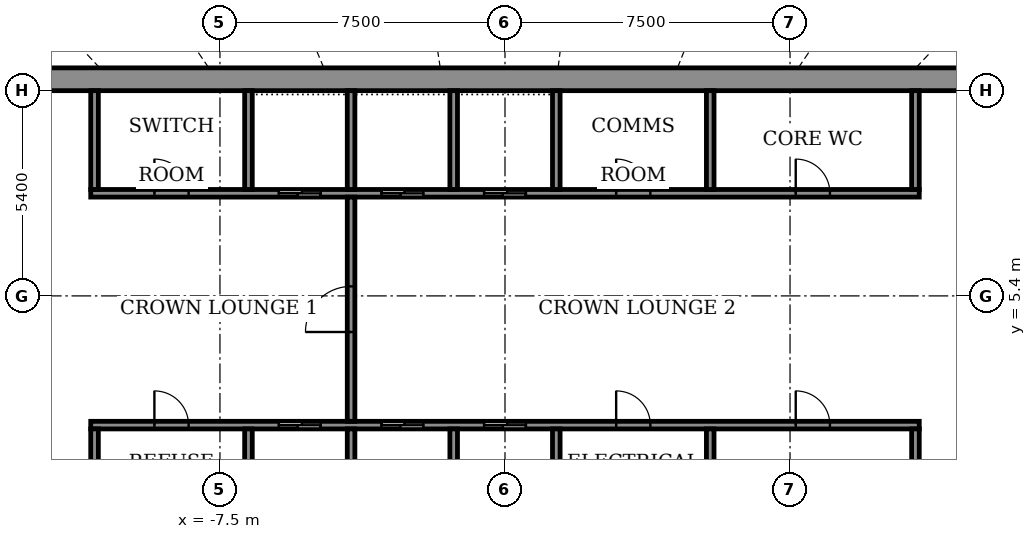
"""IFC4 building model, lengths in metres.
Left out: names, types, materials, properties, quantities, classifications, styles, units other than length and angle.
Written with IfcOpenShell. Run it as: python <this file> out.ifc"""

import sys

from ifc_helpers import new_model, si_unit, direction, frame, frame_2d, origin, place, context, subcontext, project, spatial, rectangle, extrude, element, fill, save


model = new_model("IFC4")
c1 = context("Model", 3, precision=1e-05, world=origin(), true_north=direction((0.0, 1.0)))
c2 = subcontext(c1, "Body", "Model", "MODEL_VIEW")
j1 = project(units=[si_unit("LENGTHUNIT", "METRE"), si_unit("PLANEANGLEUNIT", "RADIAN")], contexts=[c1])
p1 = place(None, origin())
s1 = spatial("IfcSite", under=j1, at=p1, CompositionType="ELEMENT")
p2 = place(p1, origin())
s2 = spatial("IfcBuilding", under=s1, at=p2, CompositionType="ELEMENT")
p3 = place(p2, frame((0.0, 0.0, 329.7)))
s3 = spatial("IfcBuildingStorey", under=s2, at=p3, CompositionType="ELEMENT", Elevation=329.7)
p4 = place(p3, frame((-14.4, 11.1, 0.0), z_axis=(0.0, 0.0, 1.0), x_axis=(1.0, 0.0, 0.0)))
e1 = element("IfcWall", 1, at=p4, inside=s3, PredefinedType="SHEAR", context=c2, shape_type="SweptSolid", body=[
    extrude(rectangle(XDim=28.8, YDim=0.6, at=frame_2d((14.4, 0.0))), origin(), (0.0, 0.0, 1.0), 4.6),
])
p5 = place(p3, frame((-10.9, 2.0, 0.0), z_axis=(0.0, 0.0, 1.0), x_axis=(1.0, 0.0, 0.0)))
e2 = element("IfcWall", 2, at=p5, inside=s3, PredefinedType="SHEAR", context=c2, shape_type="SweptSolid", body=[
    extrude(rectangle(XDim=21.8, YDim=0.2, at=frame_2d((10.9, 0.0))), origin(), (0.0, 0.0, 1.0), 4.05),
])
p6 = place(p5, frame((4.95, 0.0, 0.0)))
e3 = element("IfcOpeningElement", 3, at=p6, cuts=e2, PredefinedType="OPENING", context=c2, shape_type="SweptSolid", body=[
    extrude(rectangle(XDim=1.1, YDim=2.1, at=frame_2d((0.55, 1.05))), frame((0.0, 0.11, 0.0), z_axis=(0.0, -1.0, 0.0), x_axis=(1.0, 0.0, 0.0)), (0.0, 0.0, 1.0), 0.22),
])
p7 = place(p5, frame((7.65, 0.0, 0.0)))
e4 = element("IfcOpeningElement", 4, at=p7, cuts=e2, PredefinedType="OPENING", context=c2, shape_type="SweptSolid", body=[
    extrude(rectangle(XDim=1.1, YDim=2.1, at=frame_2d((0.55, 1.05))), frame((0.0, 0.11, 0.0), z_axis=(0.0, -1.0, 0.0), x_axis=(1.0, 0.0, 0.0)), (0.0, 0.0, 1.0), 0.22),
])
p8 = place(p5, frame((10.35, 0.0, 0.0)))
e5 = element("IfcOpeningElement", 5, at=p8, cuts=e2, PredefinedType="OPENING", context=c2, shape_type="SweptSolid", body=[
    extrude(rectangle(XDim=1.1, YDim=2.1, at=frame_2d((0.55, 1.05))), frame((0.0, 0.11, 0.0), z_axis=(0.0, -1.0, 0.0), x_axis=(1.0, 0.0, 0.0)), (0.0, 0.0, 1.0), 0.22),
])
p9 = place(p5, frame((1.675, 0.0, 0.0)))
e6 = element("IfcOpeningElement", 6, at=p9, cuts=e2, PredefinedType="OPENING", context=c2, shape_type="SweptSolid", body=[
    extrude(rectangle(XDim=0.9, YDim=2.1, at=frame_2d((0.45, 1.05))), frame((0.0, 0.11, 0.0), z_axis=(0.0, -1.0, 0.0), x_axis=(1.0, 0.0, 0.0)), (0.0, 0.0, 1.0), 0.22),
])
p10 = place(p5, frame((13.825, 0.0, 0.0)))
e7 = element("IfcOpeningElement", 7, at=p10, cuts=e2, PredefinedType="OPENING", context=c2, shape_type="SweptSolid", body=[
    extrude(rectangle(XDim=0.9, YDim=2.1, at=frame_2d((0.45, 1.05))), frame((0.0, 0.11, 0.0), z_axis=(0.0, -1.0, 0.0), x_axis=(1.0, 0.0, 0.0)), (0.0, 0.0, 1.0), 0.22),
])
p11 = place(p5, frame((18.55, 0.0, 0.0)))
e8 = element("IfcOpeningElement", 8, at=p11, cuts=e2, PredefinedType="OPENING", context=c2, shape_type="SweptSolid", body=[
    extrude(rectangle(XDim=0.9, YDim=2.1, at=frame_2d((0.45, 1.05))), frame((0.0, 0.11, 0.0), z_axis=(0.0, -1.0, 0.0), x_axis=(1.0, 0.0, 0.0)), (0.0, 0.0, 1.0), 0.22),
])
p12 = place(p3, frame((-10.9, 8.1, 0.0), z_axis=(0.0, 0.0, 1.0), x_axis=(1.0, 0.0, 0.0)))
e9 = element("IfcWall", 9, at=p12, inside=s3, PredefinedType="SHEAR", context=c2, shape_type="SweptSolid", body=[
    extrude(rectangle(XDim=21.8, YDim=0.2, at=frame_2d((10.9, 0.0))), origin(), (0.0, 0.0, 1.0), 4.05),
])
p13 = place(p12, frame((4.95, 0.0, 0.0)))
e10 = element("IfcOpeningElement", 10, at=p13, cuts=e9, PredefinedType="OPENING", context=c2, shape_type="SweptSolid", body=[
    extrude(rectangle(XDim=1.1, YDim=2.1, at=frame_2d((0.55, 1.05))), frame((0.0, 0.11, 0.0), z_axis=(0.0, -1.0, 0.0), x_axis=(1.0, 0.0, 0.0)), (0.0, 0.0, 1.0), 0.22),
])
p14 = place(p12, frame((7.65, 0.0, 0.0)))
e11 = element("IfcOpeningElement", 11, at=p14, cuts=e9, PredefinedType="OPENING", context=c2, shape_type="SweptSolid", body=[
    extrude(rectangle(XDim=1.1, YDim=2.1, at=frame_2d((0.55, 1.05))), frame((0.0, 0.11, 0.0), z_axis=(0.0, -1.0, 0.0), x_axis=(1.0, 0.0, 0.0)), (0.0, 0.0, 1.0), 0.22),
])
p15 = place(p12, frame((10.35, 0.0, 0.0)))
e12 = element("IfcOpeningElement", 12, at=p15, cuts=e9, PredefinedType="OPENING", context=c2, shape_type="SweptSolid", body=[
    extrude(rectangle(XDim=1.1, YDim=2.1, at=frame_2d((0.55, 1.05))), frame((0.0, 0.11, 0.0), z_axis=(0.0, -1.0, 0.0), x_axis=(1.0, 0.0, 0.0)), (0.0, 0.0, 1.0), 0.22),
])
p16 = place(p12, frame((1.675, 0.0, 0.0)))
e13 = element("IfcOpeningElement", 13, at=p16, cuts=e9, PredefinedType="OPENING", context=c2, shape_type="SweptSolid", body=[
    extrude(rectangle(XDim=0.9, YDim=2.1, at=frame_2d((0.45, 1.05))), frame((0.0, 0.11, 0.0), z_axis=(0.0, -1.0, 0.0), x_axis=(1.0, 0.0, 0.0)), (0.0, 0.0, 1.0), 0.22),
])
p17 = place(p12, frame((13.825, 0.0, 0.0)))
e14 = element("IfcOpeningElement", 14, at=p17, cuts=e9, PredefinedType="OPENING", context=c2, shape_type="SweptSolid", body=[
    extrude(rectangle(XDim=0.9, YDim=2.1, at=frame_2d((0.45, 1.05))), frame((0.0, 0.11, 0.0), z_axis=(0.0, -1.0, 0.0), x_axis=(1.0, 0.0, 0.0)), (0.0, 0.0, 1.0), 0.22),
])
p18 = place(p12, frame((18.55, 0.0, 0.0)))
e15 = element("IfcOpeningElement", 15, at=p18, cuts=e9, PredefinedType="OPENING", context=c2, shape_type="SweptSolid", body=[
    extrude(rectangle(XDim=0.9, YDim=2.1, at=frame_2d((0.45, 1.05))), frame((0.0, 0.11, 0.0), z_axis=(0.0, -1.0, 0.0), x_axis=(1.0, 0.0, 0.0)), (0.0, 0.0, 1.0), 0.22),
])
p19 = place(p3, frame((-10.8, -0.6, 0.0), z_axis=(0.0, 0.0, 1.0), x_axis=(0.0, 1.0, 0.0)))
e16 = element("IfcWall", 16, at=p19, inside=s3, PredefinedType="STANDARD", context=c2, shape_type="SweptSolid", body=[
    extrude(rectangle(XDim=2.5, YDim=0.2, at=frame_2d((1.25, 0.0))), origin(), (0.0, 0.0, 1.0), 4.05),
])
for number, where, z_axis, x_axis in (
    (17, (-6.75, -0.6, 0.0), (0.0, 0.0, 1.0), (0.0, 1.0, 0.0)),
    (18, (-4.05, -0.6, 0.0), (0.0, 0.0, 1.0), (0.0, 1.0, 0.0)),
    (19, (-1.35, -0.6, 0.0), (0.0, 0.0, 1.0), (0.0, 1.0, 0.0)),
    (20, (1.35, -0.6, 0.0), (0.0, 0.0, 1.0), (0.0, 1.0, 0.0)),
):
    element("IfcWall", number, at=place(p3, frame(where, z_axis=z_axis, x_axis=x_axis)), inside=s3, PredefinedType="SHEAR", context=c2, shape_type="SweptSolid", body=[
        extrude(rectangle(XDim=2.5, YDim=0.2, at=frame_2d((1.25, 0.0))), origin(), (0.0, 0.0, 1.0), 4.05),
    ])
for number, where, z_axis, x_axis in (
    (21, (5.4, -0.6, 0.0), (0.0, 0.0, 1.0), (0.0, 1.0, 0.0)),
    (22, (10.8, -0.6, 0.0), (0.0, 0.0, 1.0), (0.0, 1.0, 0.0)),
):
    element("IfcWall", number, at=place(p3, frame(where, z_axis=z_axis, x_axis=x_axis)), inside=s3, PredefinedType="STANDARD", context=c2, shape_type="SweptSolid", body=[
        extrude(rectangle(XDim=2.5, YDim=0.2, at=frame_2d((1.25, 0.0))), origin(), (0.0, 0.0, 1.0), 4.05),
    ])
p20 = place(p3, frame((-10.8, 8.2, 0.0), z_axis=(0.0, 0.0, 1.0), x_axis=(0.0, 1.0, 0.0)))
e23 = element("IfcWall", 23, at=p20, inside=s3, PredefinedType="STANDARD", context=c2, shape_type="SweptSolid", body=[
    extrude(rectangle(XDim=2.6, YDim=0.2, at=frame_2d((1.3, 0.0))), origin(), (0.0, 0.0, 1.0), 4.05),
])
for number, where, z_axis, x_axis in (
    (24, (-6.75, 8.2, 0.0), (0.0, 0.0, 1.0), (0.0, 1.0, 0.0)),
    (25, (-4.05, 8.2, 0.0), (0.0, 0.0, 1.0), (0.0, 1.0, 0.0)),
    (26, (-1.35, 8.2, 0.0), (0.0, 0.0, 1.0), (0.0, 1.0, 0.0)),
    (27, (1.35, 8.2, 0.0), (0.0, 0.0, 1.0), (0.0, 1.0, 0.0)),
):
    element("IfcWall", number, at=place(p3, frame(where, z_axis=z_axis, x_axis=x_axis)), inside=s3, PredefinedType="SHEAR", context=c2, shape_type="SweptSolid", body=[
        extrude(rectangle(XDim=2.6, YDim=0.2, at=frame_2d((1.3, 0.0))), origin(), (0.0, 0.0, 1.0), 4.05),
    ])
for number, where, z_axis, x_axis in (
    (28, (5.4, 8.2, 0.0), (0.0, 0.0, 1.0), (0.0, 1.0, 0.0)),
    (29, (10.8, 8.2, 0.0), (0.0, 0.0, 1.0), (0.0, 1.0, 0.0)),
):
    element("IfcWall", number, at=place(p3, frame(where, z_axis=z_axis, x_axis=x_axis)), inside=s3, PredefinedType="STANDARD", context=c2, shape_type="SweptSolid", body=[
        extrude(rectangle(XDim=2.6, YDim=0.2, at=frame_2d((1.3, 0.0))), origin(), (0.0, 0.0, 1.0), 4.05),
    ])
p21 = place(p3, frame((-4.05, 2.1, 0.0), z_axis=(0.0, 0.0, 1.0), x_axis=(0.0, 1.0, 0.0)))
e30 = element("IfcWall", 30, at=p21, inside=s3, PredefinedType="STANDARD", context=c2, shape_type="SweptSolid", body=[
    extrude(rectangle(XDim=5.9, YDim=0.2, at=frame_2d((2.95, 0.0))), origin(), (0.0, 0.0, 1.0), 4.05),
])
p22 = place(p21, frame((2.35, 0.0, 0.0)))
e31 = element("IfcOpeningElement", 31, at=p22, cuts=e30, PredefinedType="OPENING", context=c2, shape_type="SweptSolid", body=[
    extrude(rectangle(XDim=1.2, YDim=2.1, at=frame_2d((0.6, 1.05))), frame((0.0, 0.11, 0.0), z_axis=(0.0, -1.0, 0.0), x_axis=(1.0, 0.0, 0.0)), (0.0, 0.0, 1.0), 0.22),
])
p23 = place(p6, origin())
e32 = element("IfcDoor", 32, at=p23, inside=s3, OperationType="SLIDING_TO_LEFT", PredefinedType="DOOR", context=c2, shape_type="SweptSolid", body=[
    extrude(rectangle(XDim=1.1, YDim=2.1, at=frame_2d((0.55, 1.05))), frame((0.0, 0.025, 0.0), z_axis=(0.0, -1.0, 0.0), x_axis=(1.0, 0.0, 0.0)), (0.0, 0.0, 1.0), 0.05),
])
fill(e3, e32)
p24 = place(p7, origin())
e33 = element("IfcDoor", 33, at=p24, inside=s3, OperationType="SLIDING_TO_LEFT", PredefinedType="DOOR", context=c2, shape_type="SweptSolid", body=[
    extrude(rectangle(XDim=1.1, YDim=2.1, at=frame_2d((0.55, 1.05))), frame((0.0, 0.025, 0.0), z_axis=(0.0, -1.0, 0.0), x_axis=(1.0, 0.0, 0.0)), (0.0, 0.0, 1.0), 0.05),
])
fill(e4, e33)
p25 = place(p8, origin())
e34 = element("IfcDoor", 34, at=p25, inside=s3, OperationType="SLIDING_TO_LEFT", PredefinedType="DOOR", context=c2, shape_type="SweptSolid", body=[
    extrude(rectangle(XDim=1.1, YDim=2.1, at=frame_2d((0.55, 1.05))), frame((0.0, 0.025, 0.0), z_axis=(0.0, -1.0, 0.0), x_axis=(1.0, 0.0, 0.0)), (0.0, 0.0, 1.0), 0.05),
])
fill(e5, e34)
p26 = place(p13, origin())
e35 = element("IfcDoor", 35, at=p26, inside=s3, OperationType="SLIDING_TO_LEFT", PredefinedType="DOOR", context=c2, shape_type="SweptSolid", body=[
    extrude(rectangle(XDim=1.1, YDim=2.1, at=frame_2d((0.55, 1.05))), frame((0.0, 0.025, 0.0), z_axis=(0.0, -1.0, 0.0), x_axis=(1.0, 0.0, 0.0)), (0.0, 0.0, 1.0), 0.05),
])
fill(e10, e35)
p27 = place(p14, origin())
e36 = element("IfcDoor", 36, at=p27, inside=s3, OperationType="SLIDING_TO_LEFT", PredefinedType="DOOR", context=c2, shape_type="SweptSolid", body=[
    extrude(rectangle(XDim=1.1, YDim=2.1, at=frame_2d((0.55, 1.05))), frame((0.0, 0.025, 0.0), z_axis=(0.0, -1.0, 0.0), x_axis=(1.0, 0.0, 0.0)), (0.0, 0.0, 1.0), 0.05),
])
fill(e11, e36)
p28 = place(p15, origin())
e37 = element("IfcDoor", 37, at=p28, inside=s3, OperationType="SLIDING_TO_LEFT", PredefinedType="DOOR", context=c2, shape_type="SweptSolid", body=[
    extrude(rectangle(XDim=1.1, YDim=2.1, at=frame_2d((0.55, 1.05))), frame((0.0, 0.025, 0.0), z_axis=(0.0, -1.0, 0.0), x_axis=(1.0, 0.0, 0.0)), (0.0, 0.0, 1.0), 0.05),
])
fill(e12, e37)
p29 = place(p9, origin())
e38 = element("IfcDoor", 38, at=p29, inside=s3, OperationType="SINGLE_SWING_RIGHT", PredefinedType="DOOR", context=c2, shape_type="SweptSolid", body=[
    extrude(rectangle(XDim=0.9, YDim=2.1, at=frame_2d((0.45, 1.05))), frame((0.0, 0.025, 0.0), z_axis=(0.0, -1.0, 0.0), x_axis=(1.0, 0.0, 0.0)), (0.0, 0.0, 1.0), 0.05),
])
fill(e6, e38)
p30 = place(p10, origin())
e39 = element("IfcDoor", 39, at=p30, inside=s3, OperationType="SINGLE_SWING_LEFT", PredefinedType="DOOR", context=c2, shape_type="SweptSolid", body=[
    extrude(rectangle(XDim=0.9, YDim=2.1, at=frame_2d((0.45, 1.05))), frame((0.0, 0.025, 0.0), z_axis=(0.0, -1.0, 0.0), x_axis=(1.0, 0.0, 0.0)), (0.0, 0.0, 1.0), 0.05),
])
fill(e7, e39)
p31 = place(p11, origin())
e40 = element("IfcDoor", 40, at=p31, inside=s3, OperationType="SINGLE_SWING_RIGHT", PredefinedType="DOOR", context=c2, shape_type="SweptSolid", body=[
    extrude(rectangle(XDim=0.9, YDim=2.1, at=frame_2d((0.45, 1.05))), frame((0.0, 0.025, 0.0), z_axis=(0.0, -1.0, 0.0), x_axis=(1.0, 0.0, 0.0)), (0.0, 0.0, 1.0), 0.05),
])
fill(e8, e40)
p32 = place(p16, origin())
e41 = element("IfcDoor", 41, at=p32, inside=s3, OperationType="SINGLE_SWING_LEFT", PredefinedType="DOOR", context=c2, shape_type="SweptSolid", body=[
    extrude(rectangle(XDim=0.9, YDim=2.1, at=frame_2d((0.45, 1.05))), frame((0.0, 0.025, 0.0), z_axis=(0.0, -1.0, 0.0), x_axis=(1.0, 0.0, 0.0)), (0.0, 0.0, 1.0), 0.05),
])
fill(e13, e41)
p33 = place(p17, origin())
e42 = element("IfcDoor", 42, at=p33, inside=s3, OperationType="SINGLE_SWING_LEFT", PredefinedType="DOOR", context=c2, shape_type="SweptSolid", body=[
    extrude(rectangle(XDim=0.9, YDim=2.1, at=frame_2d((0.45, 1.05))), frame((0.0, 0.025, 0.0), z_axis=(0.0, -1.0, 0.0), x_axis=(1.0, 0.0, 0.0)), (0.0, 0.0, 1.0), 0.05),
])
fill(e14, e42)
p34 = place(p18, origin())
e43 = element("IfcDoor", 43, at=p34, inside=s3, OperationType="SINGLE_SWING_RIGHT", PredefinedType="DOOR", context=c2, shape_type="SweptSolid", body=[
    extrude(rectangle(XDim=0.9, YDim=2.1, at=frame_2d((0.45, 1.05))), frame((0.0, 0.025, 0.0), z_axis=(0.0, -1.0, 0.0), x_axis=(1.0, 0.0, 0.0)), (0.0, 0.0, 1.0), 0.05),
])
fill(e15, e43)
p35 = place(p22, origin())
e44 = element("IfcDoor", 44, at=p35, inside=s3, OperationType="SINGLE_SWING_LEFT", PredefinedType="DOOR", context=c2, shape_type="SweptSolid", body=[
    extrude(rectangle(XDim=1.2, YDim=2.1, at=frame_2d((0.6, 1.05))), frame((0.0, 0.025, 0.0), z_axis=(0.0, -1.0, 0.0), x_axis=(1.0, 0.0, 0.0)), (0.0, 0.0, 1.0), 0.05),
])
fill(e31, e44)
save(model, sys.argv[1])
